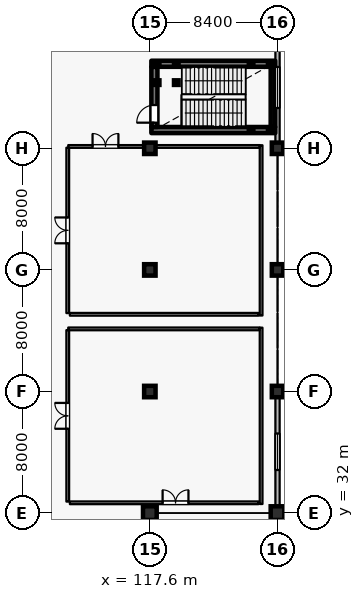
"""IFC4 building model, lengths in metres.
Left out: names, types, materials, properties, quantities, classifications, styles, units other than length and angle.
Written with IfcOpenShell. Run it as: python <this file> out.ifc"""

import sys

from ifc_helpers import new_model, si_unit, direction, frame, frame_2d, origin, origin_2d, place, context, subcontext, project, spatial, rectangle, hollow_rectangle, circle, extrude, element, fill, save


model = new_model("IFC4")
c1 = context("Model", 3, precision=1e-05, world=origin(), true_north=direction((0.0, 1.0)))
c2 = subcontext(c1, "Body", "Model", "MODEL_VIEW")
j1 = project(units=[si_unit("LENGTHUNIT", "METRE"), si_unit("PLANEANGLEUNIT", "RADIAN")], contexts=[c1])
p1 = place(None, origin())
s1 = spatial("IfcSite", under=j1, at=p1, CompositionType="ELEMENT")
p2 = place(p1, origin())
s2 = spatial("IfcBuilding", under=s1, at=p2, CompositionType="ELEMENT")
p3 = place(p2, frame((0.0, 0.0, 6.0)))
s3 = spatial("IfcBuildingStorey", under=s2, at=p3, CompositionType="ELEMENT", Elevation=6.0)
p4 = place(p3, frame((117.6, 32.0, 0.0), z_axis=(0.0, 0.0, 1.0), x_axis=(1.0, 0.0, 0.0)))
e1 = element("IfcColumn", 1, at=p4, inside=s3, PredefinedType="COLUMN", context=c2, shape_type="SweptSolid", body=[
    extrude(circle(Radius=0.45, at=origin_2d()), origin(), (0.0, 0.0, 1.0), 5.4),
])
for number, where, z_axis, x_axis in (
    (2, (117.6, 40.0, 0.0), (0.0, 0.0, 1.0), (1.0, 0.0, 0.0)),
    (3, (117.6, 48.0, 0.0), (0.0, 0.0, 1.0), (1.0, 0.0, 0.0)),
    (4, (117.6, 56.0, 0.0), (0.0, 0.0, 1.0), (1.0, 0.0, 0.0)),
):
    element("IfcColumn", number, at=place(p3, frame(where, z_axis=z_axis, x_axis=x_axis)), inside=s3, PredefinedType="COLUMN", context=c2, shape_type="SweptSolid", body=[
        extrude(rectangle(XDim=0.75, YDim=0.75, at=origin_2d()), origin(), (0.0, 0.0, 1.0), 5.4),
    ])
p5 = place(p3, frame((126.0, 32.0, 0.0), z_axis=(0.0, 0.0, 1.0), x_axis=(1.0, 0.0, 0.0)))
e5 = element("IfcColumn", 5, at=p5, inside=s3, PredefinedType="COLUMN", context=c2, shape_type="SweptSolid", body=[
    extrude(circle(Radius=0.45, at=origin_2d()), origin(), (0.0, 0.0, 1.0), 5.4),
])
for number, where, z_axis, x_axis in (
    (6, (126.0, 40.0, 0.0), (0.0, 0.0, 1.0), (1.0, 0.0, 0.0)),
    (7, (126.0, 48.0, 0.0), (0.0, 0.0, 1.0), (1.0, 0.0, 0.0)),
    (8, (126.0, 56.0, 0.0), (0.0, 0.0, 1.0), (1.0, 0.0, 0.0)),
):
    element("IfcColumn", number, at=place(p3, frame(where, z_axis=z_axis, x_axis=x_axis)), inside=s3, PredefinedType="COLUMN", context=c2, shape_type="SweptSolid", body=[
        extrude(rectangle(XDim=0.75, YDim=0.75, at=origin_2d()), origin(), (0.0, 0.0, 1.0), 5.4),
    ])
p6 = place(p3, frame((126.0, 63.625, 0.0), z_axis=(0.0, 0.0, 1.0), x_axis=(0.0, -1.0, 0.0)))
e9 = element("IfcWall", 9, at=p6, inside=s3, PredefinedType="SOLIDWALL", context=c2, shape_type="SweptSolid", body=[
    extrude(rectangle(XDim=7.25, YDim=0.28, at=frame_2d((3.625, 0.0))), origin(), (0.0, 0.0, 1.0), 5.1),
])
p7 = place(p6, frame((2.275, 0.0, 1.0)))
e10 = element("IfcOpeningElement", 10, at=p7, cuts=e9, PredefinedType="OPENING", context=c2, shape_type="SweptSolid", body=[
    extrude(rectangle(XDim=2.7, YDim=1.2, at=frame_2d((1.35, 0.6))), frame((0.0, 0.15, 0.0), z_axis=(0.0, -1.0, 0.0), x_axis=(1.0, 0.0, 0.0)), (0.0, 0.0, 1.0), 0.3),
])
p8 = place(p3, frame((126.0, 39.625, 0.0), z_axis=(0.0, 0.0, 1.0), x_axis=(0.0, -1.0, 0.0)))
e11 = element("IfcWall", 11, at=p8, inside=s3, PredefinedType="SOLIDWALL", context=c2, shape_type="SweptSolid", body=[
    extrude(rectangle(XDim=7.175, YDim=0.28, at=frame_2d((3.587, 0.0))), origin(), (0.0, 0.0, 1.0), 5.1),
])
p9 = place(p8, frame((2.387, 0.0, 1.0)))
e12 = element("IfcOpeningElement", 12, at=p9, cuts=e11, PredefinedType="OPENING", context=c2, shape_type="SweptSolid", body=[
    extrude(rectangle(XDim=2.4, YDim=1.2, at=frame_2d((1.2, 0.6))), frame((0.0, 0.15, 0.0), z_axis=(0.0, -1.0, 0.0), x_axis=(1.0, 0.0, 0.0)), (0.0, 0.0, 1.0), 0.3),
])
p10 = place(p3, frame((117.7, 57.2, 0.0), z_axis=(0.0, 0.0, 1.0), x_axis=(1.0, 0.0, 0.0)))
e13 = element("IfcWall", 13, at=p10, inside=s3, PredefinedType="SHEAR", context=c2, shape_type="SweptSolid", body=[
    extrude(rectangle(XDim=8.15, YDim=0.4, at=frame_2d((4.075, 0.0))), origin(), (0.0, 0.0, 1.0), 5.045),
])
p11 = place(p3, frame((125.7, 57.405, 0.0), z_axis=(0.0, 0.0, 1.0), x_axis=(0.0, 1.0, 0.0)))
e14 = element("IfcWall", 14, at=p11, inside=s3, PredefinedType="SHEAR", context=c2, shape_type="SweptSolid", body=[
    extrude(rectangle(XDim=3.95, YDim=0.3, at=frame_2d((1.975, 0.0))), origin(), (0.0, 0.0, 1.0), 5.045),
])
p12 = place(p3, frame((117.7, 61.56, 0.0), z_axis=(0.0, 0.0, 1.0), x_axis=(1.0, 0.0, 0.0)))
e15 = element("IfcWall", 15, at=p12, inside=s3, PredefinedType="SHEAR", context=c2, shape_type="SweptSolid", body=[
    extrude(rectangle(XDim=8.15, YDim=0.4, at=frame_2d((4.075, 0.0))), origin(), (0.0, 0.0, 1.0), 5.045),
])
p13 = place(p3, frame((117.9, 57.405, 0.0), z_axis=(0.0, 0.0, 1.0), x_axis=(0.0, 1.0, 0.0)))
e16 = element("IfcWall", 16, at=p13, inside=s3, PredefinedType="SHEAR", context=c2, shape_type="SweptSolid", body=[
    extrude(rectangle(XDim=3.95, YDim=0.4, at=frame_2d((1.975, 0.0))), origin(), (0.0, 0.0, 1.0), 5.045),
])
p14 = place(p13, frame((0.28, 0.0, 0.0)))
e17 = element("IfcOpeningElement", 17, at=p14, cuts=e16, PredefinedType="OPENING", context=c2, shape_type="SweptSolid", body=[
    extrude(rectangle(XDim=1.16, YDim=2.2, at=frame_2d((0.58, 1.1))), frame((0.0, 0.21, 0.0), z_axis=(0.0, -1.0, 0.0), x_axis=(1.0, 0.0, 0.0)), (0.0, 0.0, 1.0), 0.42),
])
for number, where, z_axis, x_axis in (
    (18, (118.08, 60.32, 0.0), (0.0, 0.0, 1.0), (1.0, 0.0, 0.0)),
    (19, (118.08, 61.56, 0.0), (0.0, 0.0, 1.0), (1.0, 0.0, 0.0)),
    (20, (119.34, 60.32, 0.0), (0.0, 0.0, 1.0), (1.0, 0.0, 0.0)),
    (21, (119.34, 61.56, 0.0), (0.0, 0.0, 1.0), (1.0, 0.0, 0.0)),
):
    element("IfcColumn", number, at=place(p3, frame(where, z_axis=z_axis, x_axis=x_axis)), inside=s3, PredefinedType="COLUMN", context=c2, shape_type="SweptSolid", body=[
        extrude(hollow_rectangle(XDim=0.3, YDim=0.3, WallThickness=0.012, at=origin_2d()), origin(), (0.0, 0.0, 1.0), 5.22),
    ])
for number, where, z_axis, x_axis in (
    (22, (124.26, 57.2, -3.0), (0.0, 0.0, 1.0), (1.0, 0.0, 0.0)),
    (23, (124.26, 61.56, -3.0), (0.0, 0.0, 1.0), (1.0, 0.0, 0.0)),
    (24, (125.52, 57.2, -3.0), (0.0, 0.0, 1.0), (1.0, 0.0, 0.0)),
    (25, (125.52, 61.56, -3.0), (0.0, 0.0, 1.0), (1.0, 0.0, 0.0)),
):
    element("IfcColumn", number, at=place(p3, frame(where, z_axis=z_axis, x_axis=x_axis)), inside=s3, PredefinedType="COLUMN", context=c2, shape_type="SweptSolid", body=[
        extrude(hollow_rectangle(XDim=0.3, YDim=0.3, WallThickness=0.012, at=origin_2d()), origin(), (0.0, 0.0, 1.0), 5.52),
    ])
p15 = place(p3, frame((112.2, 32.76, 0.0), z_axis=(0.0, 0.0, 1.0), x_axis=(0.0, 1.0, 0.0)))
e26 = element("IfcWall", 26, at=p15, inside=s3, PredefinedType="PARTITIONING", context=c2, shape_type="SweptSolid", body=[
    extrude(rectangle(XDim=11.28, YDim=0.18, at=frame_2d((5.64, 0.0))), origin(), (0.0, 0.0, 1.0), 5.045),
])
p16 = place(p15, frame((4.79, 0.0, 0.0)))
e27 = element("IfcOpeningElement", 27, at=p16, cuts=e26, PredefinedType="OPENING", context=c2, shape_type="SweptSolid", body=[
    extrude(rectangle(XDim=1.7, YDim=2.3, at=frame_2d((0.85, 1.15))), frame((0.0, 0.1, 0.0), z_axis=(0.0, -1.0, 0.0), x_axis=(1.0, 0.0, 0.0)), (0.0, 0.0, 1.0), 0.2),
])
p17 = place(p3, frame((112.34, 32.68, 0.0), z_axis=(0.0, 0.0, 1.0), x_axis=(1.0, 0.0, 0.0)))
e28 = element("IfcWall", 28, at=p17, inside=s3, PredefinedType="PARTITIONING", context=c2, shape_type="SweptSolid", body=[
    extrude(rectangle(XDim=12.41, YDim=0.18, at=frame_2d((6.205, 0.0))), origin(), (0.0, 0.0, 1.0), 5.045),
])
p18 = place(p17, frame((6.1, 0.0, 0.0)))
e29 = element("IfcOpeningElement", 29, at=p18, cuts=e28, PredefinedType="OPENING", context=c2, shape_type="SweptSolid", body=[
    extrude(rectangle(XDim=1.7, YDim=2.3, at=frame_2d((0.85, 1.15))), frame((0.0, 0.1, 0.0), z_axis=(0.0, -1.0, 0.0), x_axis=(1.0, 0.0, 0.0)), (0.0, 0.0, 1.0), 0.2),
])
p19 = place(p3, frame((112.2, 45.16, 0.0), z_axis=(0.0, 0.0, 1.0), x_axis=(0.0, 1.0, 0.0)))
e30 = element("IfcWall", 30, at=p19, inside=s3, PredefinedType="PARTITIONING", context=c2, shape_type="SweptSolid", body=[
    extrude(rectangle(XDim=10.88, YDim=0.18, at=frame_2d((5.44, 0.0))), origin(), (0.0, 0.0, 1.0), 5.045),
])
p20 = place(p19, frame((4.59, 0.0, 0.0)))
e31 = element("IfcOpeningElement", 31, at=p20, cuts=e30, PredefinedType="OPENING", context=c2, shape_type="SweptSolid", body=[
    extrude(rectangle(XDim=1.7, YDim=2.3, at=frame_2d((0.85, 1.15))), frame((0.0, 0.1, 0.0), z_axis=(0.0, -1.0, 0.0), x_axis=(1.0, 0.0, 0.0)), (0.0, 0.0, 1.0), 0.2),
])
p21 = place(p3, frame((112.34, 45.08, 0.0), z_axis=(0.0, 0.0, 1.0), x_axis=(1.0, 0.0, 0.0)))
e32 = element("IfcWall", 32, at=p21, inside=s3, PredefinedType="PARTITIONING", context=c2, shape_type="SweptSolid", body=[
    extrude(rectangle(XDim=12.41, YDim=0.18, at=frame_2d((6.205, 0.0))), origin(), (0.0, 0.0, 1.0), 5.045),
])
p22 = place(p3, frame((124.92, 32.6, 0.0), z_axis=(0.0, 0.0, 1.0), x_axis=(0.0, 1.0, 0.0)))
e33 = element("IfcWall", 33, at=p22, inside=s3, PredefinedType="PARTITIONING", context=c2, shape_type="SweptSolid", body=[
    extrude(rectangle(XDim=11.6, YDim=0.18, at=frame_2d((5.8, 0.0))), origin(), (0.0, 0.0, 1.0), 5.045),
])
p23 = place(p3, frame((112.232, 44.12, 0.0), z_axis=(0.0, 0.0, 1.0), x_axis=(1.0, 0.0, 0.0)))
e34 = element("IfcWall", 34, at=p23, inside=s3, PredefinedType="PARTITIONING", context=c2, shape_type="SweptSolid", body=[
    extrude(rectangle(XDim=12.598, YDim=0.18, at=frame_2d((6.299, 0.0))), origin(), (0.0, 0.0, 1.0), 5.045),
])
p24 = place(p3, frame((124.92, 45.0, 0.0), z_axis=(0.0, 0.0, 1.0), x_axis=(0.0, 1.0, 0.0)))
e35 = element("IfcWall", 35, at=p24, inside=s3, PredefinedType="PARTITIONING", context=c2, shape_type="SweptSolid", body=[
    extrude(rectangle(XDim=11.2, YDim=0.18, at=frame_2d((5.6, 0.0))), origin(), (0.0, 0.0, 1.0), 5.045),
])
p25 = place(p3, frame((112.232, 56.12, 0.0), z_axis=(0.0, 0.0, 1.0), x_axis=(1.0, 0.0, 0.0)))
e36 = element("IfcWall", 36, at=p25, inside=s3, PredefinedType="PARTITIONING", context=c2, shape_type="SweptSolid", body=[
    extrude(rectangle(XDim=4.993, YDim=0.18, at=frame_2d((2.497, 0.0))), origin(), (0.0, 0.0, 1.0), 4.45),
])
p26 = place(p25, frame((1.6, 0.0, 0.0)))
e37 = element("IfcOpeningElement", 37, at=p26, cuts=e36, PredefinedType="OPENING", context=c2, shape_type="SweptSolid", body=[
    extrude(rectangle(XDim=1.7, YDim=2.3, at=frame_2d((0.85, 1.15))), frame((0.0, 0.1, 0.0), z_axis=(0.0, -1.0, 0.0), x_axis=(1.0, 0.0, 0.0)), (0.0, 0.0, 1.0), 0.2),
])
p27 = place(p3, frame((117.975, 56.12, 0.0), z_axis=(0.0, 0.0, 1.0), x_axis=(1.0, 0.0, 0.0)))
e38 = element("IfcWall", 38, at=p27, inside=s3, PredefinedType="PARTITIONING", context=c2, shape_type="SweptSolid", body=[
    extrude(rectangle(XDim=6.855, YDim=0.18, at=frame_2d((3.427, 0.0))), origin(), (0.0, 0.0, 1.0), 4.45),
])
p28 = place(p7, origin())
e39 = element("IfcWindow", 39, at=p28, inside=s3, PartitioningType="DOUBLE_PANEL_VERTICAL", PredefinedType="WINDOW", context=c2, shape_type="SweptSolid", body=[
    extrude(rectangle(XDim=2.7, YDim=1.2, at=frame_2d((1.35, 0.6))), frame((0.0, 0.03, 0.0), z_axis=(0.0, -1.0, 0.0), x_axis=(1.0, 0.0, 0.0)), (0.0, 0.0, 1.0), 0.06),
])
fill(e10, e39)
p29 = place(p9, origin())
e40 = element("IfcWindow", 40, at=p29, inside=s3, PartitioningType="DOUBLE_PANEL_VERTICAL", PredefinedType="WINDOW", context=c2, shape_type="SweptSolid", body=[
    extrude(rectangle(XDim=2.4, YDim=1.2, at=frame_2d((1.2, 0.6))), frame((0.0, 0.03, 0.0), z_axis=(0.0, -1.0, 0.0), x_axis=(1.0, 0.0, 0.0)), (0.0, 0.0, 1.0), 0.06),
])
fill(e12, e40)
p30 = place(p14, origin())
e41 = element("IfcDoor", 41, at=p30, inside=s3, OperationType="SINGLE_SWING_LEFT", PredefinedType="DOOR", context=c2, shape_type="SweptSolid", body=[
    extrude(rectangle(XDim=1.16, YDim=2.2, at=frame_2d((0.58, 1.1))), frame((0.0, 0.025, 0.0), z_axis=(0.0, -1.0, 0.0), x_axis=(1.0, 0.0, 0.0)), (0.0, 0.0, 1.0), 0.05),
])
fill(e17, e41)
p31 = place(p16, origin())
e42 = element("IfcDoor", 42, at=p31, inside=s3, OperationType="DOUBLE_DOOR_SINGLE_SWING", PredefinedType="DOOR", context=c2, shape_type="SweptSolid", body=[
    extrude(rectangle(XDim=1.7, YDim=2.3, at=frame_2d((0.85, 1.15))), frame((0.0, 0.025, 0.0), z_axis=(0.0, -1.0, 0.0), x_axis=(1.0, 0.0, 0.0)), (0.0, 0.0, 1.0), 0.05),
])
fill(e27, e42)
p32 = place(p20, origin())
e43 = element("IfcDoor", 43, at=p32, inside=s3, OperationType="DOUBLE_DOOR_SINGLE_SWING", PredefinedType="DOOR", context=c2, shape_type="SweptSolid", body=[
    extrude(rectangle(XDim=1.7, YDim=2.3, at=frame_2d((0.85, 1.15))), frame((0.0, 0.025, 0.0), z_axis=(0.0, -1.0, 0.0), x_axis=(1.0, 0.0, 0.0)), (0.0, 0.0, 1.0), 0.05),
])
fill(e31, e43)
p33 = place(p18, origin())
e44 = element("IfcDoor", 44, at=p33, inside=s3, OperationType="DOUBLE_DOOR_SINGLE_SWING", PredefinedType="DOOR", context=c2, shape_type="SweptSolid", body=[
    extrude(rectangle(XDim=1.7, YDim=2.3, at=frame_2d((0.85, 1.15))), frame((0.0, 0.025, 0.0), z_axis=(0.0, -1.0, 0.0), x_axis=(1.0, 0.0, 0.0)), (0.0, 0.0, 1.0), 0.05),
])
fill(e29, e44)
p34 = place(p26, origin())
e45 = element("IfcDoor", 45, at=p34, inside=s3, OperationType="DOUBLE_DOOR_SINGLE_SWING", PredefinedType="DOOR", context=c2, shape_type="SweptSolid", body=[
    extrude(rectangle(XDim=1.7, YDim=2.3, at=frame_2d((0.85, 1.15))), frame((0.0, 0.025, 0.0), z_axis=(0.0, -1.0, 0.0), x_axis=(1.0, 0.0, 0.0)), (0.0, 0.0, 1.0), 0.05),
])
fill(e37, e45)
save(model, sys.argv[1])
